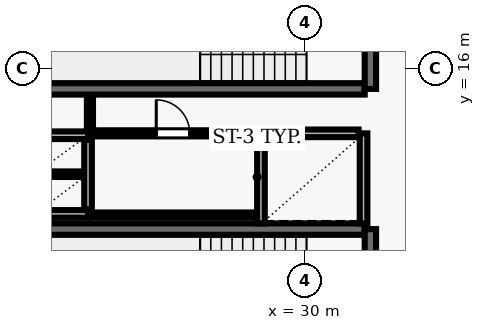
"""IFC4 building model, lengths in metres.
Left out: names, types, materials, properties, quantities, classifications, styles, units other than length and angle.
Written with IfcOpenShell. Run it as: python <this file> out.ifc"""

import sys

from ifc_helpers import new_model, si_unit, direction, frame, frame_2d, origin, place, context, subcontext, project, spatial, rectangle, extrude, element, fill, save


model = new_model("IFC4")
c1 = context("Model", 3, precision=1e-05, world=origin(), true_north=direction((0.0, 1.0)))
c2 = subcontext(c1, "Body", "Model", "MODEL_VIEW")
j1 = project(units=[si_unit("LENGTHUNIT", "METRE"), si_unit("PLANEANGLEUNIT", "RADIAN")], contexts=[c1])
p1 = place(None, origin())
s1 = spatial("IfcSite", under=j1, at=p1, CompositionType="ELEMENT")
p2 = place(p1, origin())
s2 = spatial("IfcBuilding", under=s1, at=p2, CompositionType="ELEMENT")
p3 = place(p2, frame((0.0, 0.0, 70.0)))
s3 = spatial("IfcBuildingStorey", under=s2, at=p3, CompositionType="ELEMENT", Elevation=70.0)
p4 = place(p3, frame((23.22, 15.47, 0.0), z_axis=(0.0, 0.0, 1.0), x_axis=(1.0, 0.0, 0.0)))
e1 = element("IfcWall", 1, at=p4, inside=s3, PredefinedType="SHEAR", context=c2, shape_type="SweptSolid", body=[
    extrude(rectangle(XDim=8.36, YDim=0.3, at=frame_2d((4.18, 0.0))), origin(), (0.0, 0.0, 1.0), 3.69),
])
p5 = place(p3, frame((31.73, 15.47, 0.0), z_axis=(0.0, 0.0, 1.0), x_axis=(0.0, 1.0, 0.0)))
e2 = element("IfcWall", 2, at=p5, inside=s3, PredefinedType="SHEAR", context=c2, shape_type="SweptSolid", body=[
    extrude(rectangle(XDim=3.51, YDim=0.3, at=frame_2d((1.755, 0.0))), origin(), (0.0, 0.0, 1.0), 3.69),
])
p6 = place(p5, frame((1.18, 0.0, 0.0)))
e3 = element("IfcOpeningElement", 3, at=p6, cuts=e2, PredefinedType="OPENING", context=c2, shape_type="SweptSolid", body=[
    extrude(rectangle(XDim=1.15, YDim=2.15, at=frame_2d((0.575, 1.075))), frame((0.0, 0.16, 0.0), z_axis=(0.0, -1.0, 0.0), x_axis=(1.0, 0.0, 0.0)), (0.0, 0.0, 1.0), 0.32),
])
p7 = place(p3, frame((31.58, 11.78, 0.0), z_axis=(0.0, 0.0, 1.0), x_axis=(-1.0, 0.0, 0.0)))
e4 = element("IfcWall", 4, at=p7, inside=s3, PredefinedType="SHEAR", context=c2, shape_type="SweptSolid", body=[
    extrude(rectangle(XDim=8.36, YDim=0.3, at=frame_2d((4.18, 0.0))), origin(), (0.0, 0.0, 1.0), 3.69),
])
p8 = place(p3, frame((31.73, 8.27, 0.0), z_axis=(0.0, 0.0, 1.0), x_axis=(0.0, 1.0, 0.0)))
e5 = element("IfcWall", 5, at=p8, inside=s3, PredefinedType="SHEAR", context=c2, shape_type="SweptSolid", body=[
    extrude(rectangle(XDim=3.51, YDim=0.3, at=frame_2d((1.755, 0.0))), origin(), (0.0, 0.0, 1.0), 3.69),
])
p9 = place(p8, frame((1.18, 0.0, 0.0)))
e6 = element("IfcOpeningElement", 6, at=p9, cuts=e5, PredefinedType="OPENING", context=c2, shape_type="SweptSolid", body=[
    extrude(rectangle(XDim=1.15, YDim=2.15, at=frame_2d((0.575, 1.075))), frame((0.0, 0.16, 0.0), z_axis=(0.0, -1.0, 0.0), x_axis=(1.0, 0.0, 0.0)), (0.0, 0.0, 1.0), 0.32),
])
for number, where, z_axis, x_axis in (
    (7, (28.85, 14.3, 0.0), (0.0, 0.0, 1.0), (0.0, -1.0, 0.0)),
    (8, (31.55, 11.93, 0.0), (0.0, 0.0, 1.0), (0.0, 1.0, 0.0)),
):
    element("IfcWall", number, at=place(p3, frame(where, z_axis=z_axis, x_axis=x_axis)), inside=s3, PredefinedType="SOLIDWALL", context=c2, shape_type="SweptSolid", body=[
        extrude(rectangle(XDim=2.37, YDim=0.2, at=frame_2d((1.185, 0.0))), origin(), (0.0, 0.0, 1.0), 3.69),
    ])
p10 = place(p3, frame((31.42, 14.3, 0.0), z_axis=(0.0, 0.0, 1.0), x_axis=(-1.0, 0.0, 0.0)))
e9 = element("IfcWall", 9, at=p10, inside=s3, PredefinedType="SOLIDWALL", context=c2, shape_type="SweptSolid", body=[
    extrude(rectangle(XDim=2.44, YDim=0.2, at=frame_2d((1.22, 0.0))), origin(), (0.0, 0.0, 1.0), 3.69),
])
for number, where, z_axis, x_axis in (
    (10, (22.9, 14.25, 0.0), (0.0, 0.0, 1.0), (1.0, 0.0, 0.0)),
    (11, (22.9, 12.18, 0.0), (0.0, 0.0, 1.0), (1.0, 0.0, 0.0)),
):
    element("IfcWall", number, at=place(p3, frame(where, z_axis=z_axis, x_axis=x_axis)), inside=s3, PredefinedType="SOLIDWALL", context=c2, shape_type="SweptSolid", body=[
        extrude(rectangle(XDim=1.4, YDim=0.2, at=frame_2d((0.7, 0.0))), origin(), (0.0, 0.0, 1.0), 3.69),
    ])
p11 = place(p3, frame((24.3, 12.3, 0.0), z_axis=(0.0, 0.0, 1.0), x_axis=(0.0, 1.0, 0.0)))
e12 = element("IfcWall", 12, at=p11, inside=s3, PredefinedType="SOLIDWALL", context=c2, shape_type="SweptSolid", body=[
    extrude(rectangle(XDim=1.83, YDim=0.2, at=frame_2d((0.915, 0.0))), origin(), (0.0, 0.0, 1.0), 3.69),
])
p12 = place(p3, frame((23.01, 13.225, 0.0), z_axis=(0.0, 0.0, 1.0), x_axis=(1.0, 0.0, 0.0)))
e13 = element("IfcWall", 13, at=p12, inside=s3, PredefinedType="PARTITIONING", context=c2, shape_type="SweptSolid", body=[
    extrude(rectangle(XDim=1.18, YDim=0.145, at=frame_2d((0.59, 0.0))), origin(), (0.0, 0.0, 1.0), 3.69),
])
p13 = place(p3, frame((24.35, 12.15, 0.0), z_axis=(0.0, 0.0, 1.0), x_axis=(1.0, 0.0, 0.0)))
e14 = element("IfcWall", 14, at=p13, inside=s3, PredefinedType="PARTITIONING", context=c2, shape_type="SweptSolid", body=[
    extrude(rectangle(XDim=4.37, YDim=0.135, at=frame_2d((2.185, 0.0))), origin(), (0.0, 0.0, 1.0), 3.69),
])
p14 = place(p3, frame((24.35, 14.3, 0.0), z_axis=(0.0, 0.0, 1.0), x_axis=(1.0, 0.0, 0.0)))
e15 = element("IfcWall", 15, at=p14, inside=s3, PredefinedType="PARTITIONING", context=c2, shape_type="SweptSolid", body=[
    extrude(rectangle(XDim=4.37, YDim=0.16, at=frame_2d((2.185, 0.0))), origin(), (0.0, 0.0, 1.0), 3.69),
])
p15 = place(p14, frame((1.745, 0.0, 0.0)))
e16 = element("IfcOpeningElement", 16, at=p15, cuts=e15, PredefinedType="OPENING", context=c2, shape_type="SweptSolid", body=[
    extrude(rectangle(XDim=0.88, YDim=2.1, at=frame_2d((0.44, 1.05))), frame((0.0, 0.09, 0.0), z_axis=(0.0, -1.0, 0.0), x_axis=(1.0, 0.0, 0.0)), (0.0, 0.0, 1.0), 0.18),
])
p16 = place(p3, frame((24.35, 15.29, 0.0), z_axis=(0.0, 0.0, 1.0), x_axis=(0.0, -1.0, 0.0)))
e17 = element("IfcWall", 17, at=p16, inside=s3, PredefinedType="PARTITIONING", context=c2, shape_type="SweptSolid", body=[
    extrude(rectangle(XDim=0.915, YDim=0.16, at=frame_2d((0.458, 0.0))), origin(), (0.0, 0.0, 1.0), 3.69),
])
p17 = place(p15, origin())
e18 = element("IfcDoor", 18, at=p17, inside=s3, OperationType="SINGLE_SWING_LEFT", PredefinedType="DOOR", context=c2, shape_type="SweptSolid", body=[
    extrude(rectangle(XDim=0.88, YDim=2.1, at=frame_2d((0.44, 1.05))), frame((0.0, 0.025, 0.0), z_axis=(0.0, -1.0, 0.0), x_axis=(1.0, 0.0, 0.0)), (0.0, 0.0, 1.0), 0.05),
])
fill(e16, e18)
save(model, sys.argv[1])
